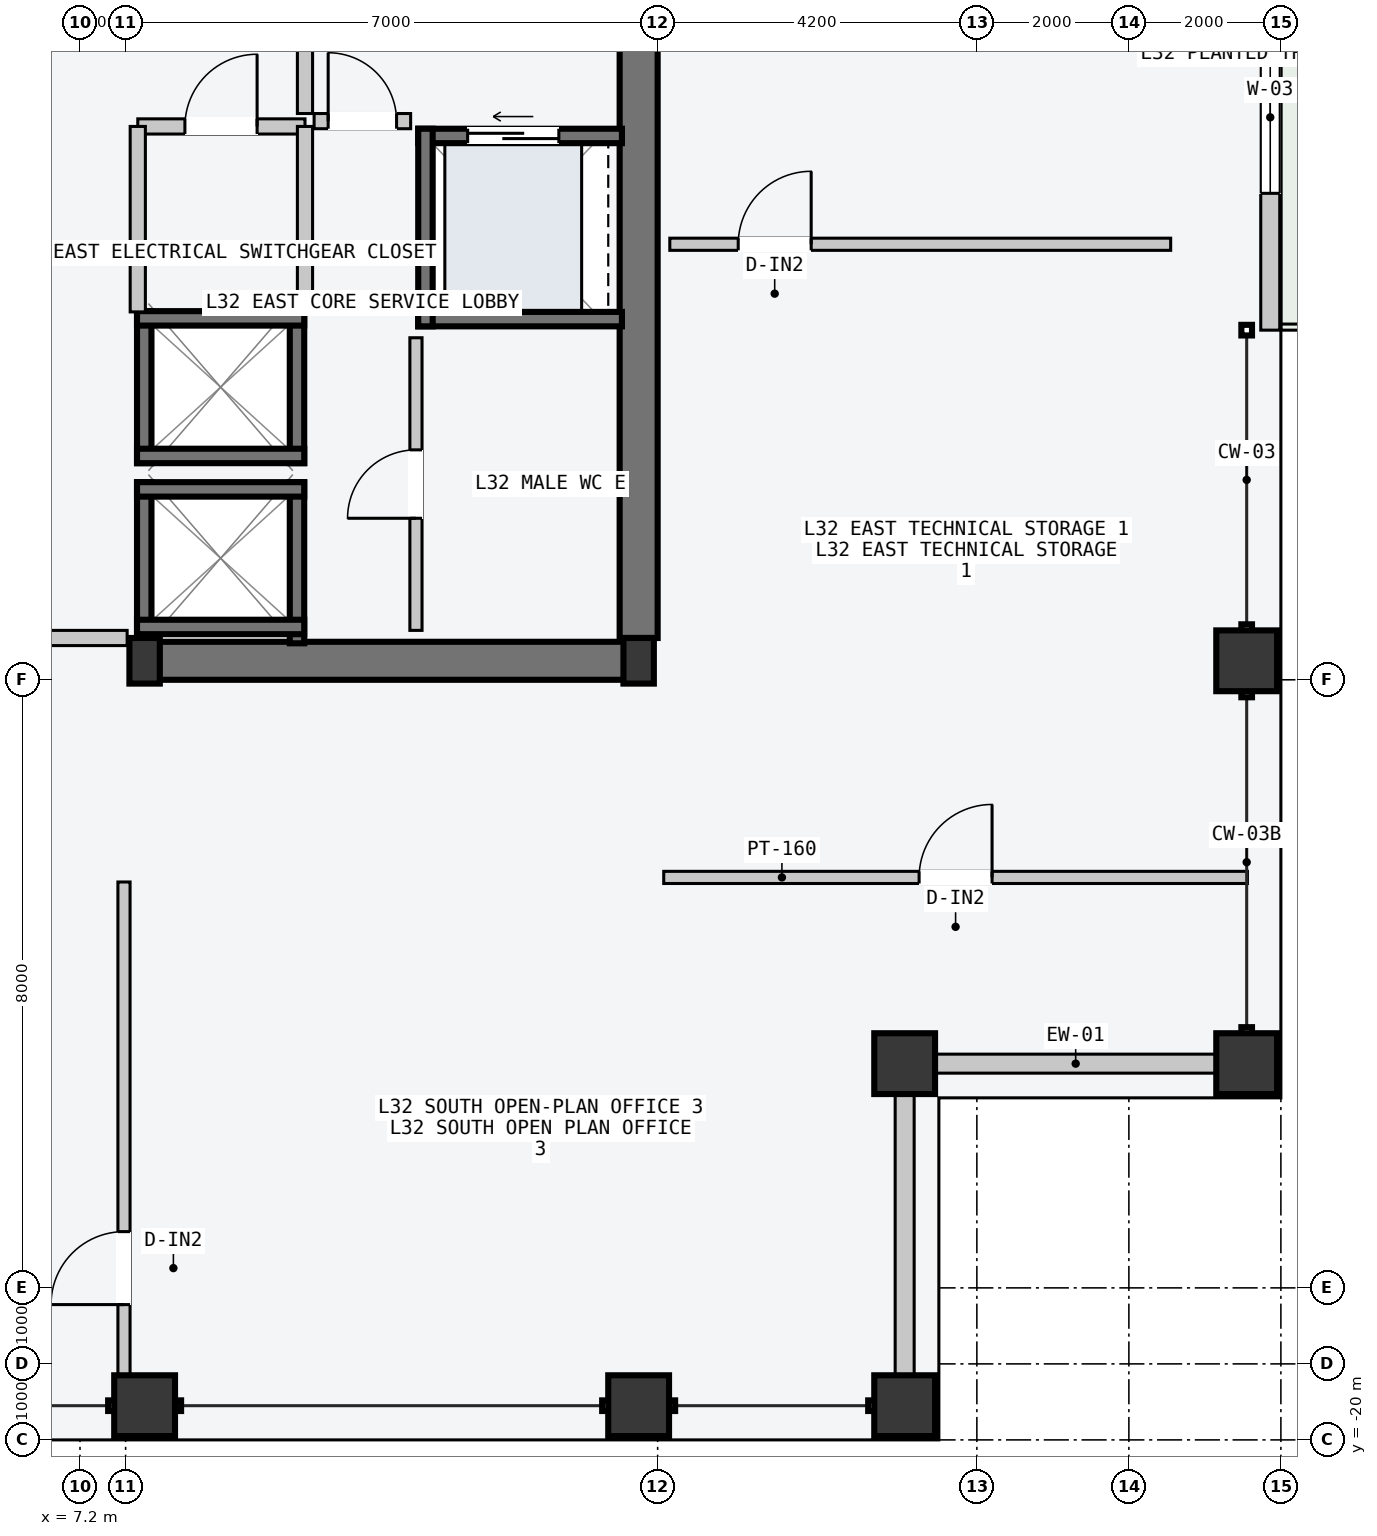
"""IFC4 building model, lengths in metres.
Left out: names, types, materials, properties, quantities, classifications, styles, units other than length and angle.
Written with IfcOpenShell. Run it as: python <this file> out.ifc"""

import sys

from ifc_helpers import new_model, si_unit, direction, frame, frame_2d, origin, origin_2d, place, context, subcontext, project, spatial, rectangle, hollow_rectangle, i_section, extrude, element, fill, save


model = new_model("IFC4")
c1 = context("Model", 3, precision=1e-05, world=origin(), true_north=direction((0.0, 1.0)))
c2 = subcontext(c1, "Body", "Model", "MODEL_VIEW")
j1 = project(units=[si_unit("LENGTHUNIT", "METRE"), si_unit("PLANEANGLEUNIT", "RADIAN")], contexts=[c1])
p1 = place(None, origin())
s1 = spatial("IfcSite", under=j1, at=p1, CompositionType="ELEMENT")
p2 = place(p1, origin())
s2 = spatial("IfcBuilding", under=s1, at=p2, CompositionType="ELEMENT")
p3 = place(p2, frame((0.0, 0.0, 124.2)))
s3 = spatial("IfcBuildingStorey", under=s2, at=p3, CompositionType="ELEMENT", Elevation=124.2)
p4 = place(p3, frame((8.07, -9.75, -0.2), z_axis=(0.0, 0.0, 1.0), x_axis=(1.0, 0.0, 0.0)))
e1 = element("IfcWall", 1, at=p4, inside=s3, PredefinedType="SHEAR", context=c2, shape_type="SweptSolid", body=[
    extrude(rectangle(XDim=6.46, YDim=0.5, at=frame_2d((3.23, 0.0))), origin(), (0.0, 0.0, 1.0), 3.6),
])
p5 = place(p3, frame((14.55, -9.45, -0.2), z_axis=(0.0, 0.0, 1.0), x_axis=(0.0, 1.0, 0.0)))
e2 = element("IfcWall", 2, at=p5, inside=s3, PredefinedType="SHEAR", context=c2, shape_type="SweptSolid", body=[
    extrude(rectangle(XDim=9.15, YDim=0.5, at=frame_2d((4.575, 0.0))), origin(), (0.0, 0.0, 1.0), 3.6),
])
for number, where, z_axis, x_axis in (
    (3, (8.05, -9.75, 0.0), (0.0, 0.0, 1.0), (1.0, 0.0, 0.0)),
    (4, (14.55, -9.75, 0.0), (0.0, 0.0, 1.0), (1.0, 0.0, 0.0)),
):
    element("IfcColumn", number, at=place(p3, frame(where, z_axis=z_axis, x_axis=x_axis)), inside=s3, PredefinedType="COLUMN", context=c2, shape_type="SweptSolid", body=[
        extrude(i_section(OverallWidth=0.4, OverallDepth=0.6, WebThickness=0.022, FlangeThickness=0.036, at=origin_2d()), origin(), (0.0, 0.0, 1.0), 3.6),
    ])
for number, where, z_axis, x_axis in (
    (5, (8.05, -19.55, 0.0), (0.0, 0.0, 1.0), (1.0, 0.0, 0.0)),
    (6, (14.55, -19.55, 0.0), (0.0, 0.0, 1.0), (1.0, 0.0, 0.0)),
    (7, (18.05, -19.55, 0.0), (0.0, 0.0, 1.0), (1.0, 0.0, 0.0)),
    (8, (22.55, -15.05, 0.0), (0.0, 0.0, 1.0), (0.0, 1.0, 0.0)),
    (9, (22.55, -9.75, 0.0), (0.0, 0.0, 1.0), (0.0, 1.0, 0.0)),
    (10, (18.05, -15.05, 0.0), (0.0, 0.0, 1.0), (1.0, 0.0, 0.0)),
):
    element("IfcColumn", number, at=place(p3, frame(where, z_axis=z_axis, x_axis=x_axis)), inside=s3, PredefinedType="COLUMN", context=c2, shape_type="SweptSolid", body=[
        extrude(hollow_rectangle(XDim=0.8, YDim=0.8, WallThickness=0.036, at=origin_2d()), origin(), (0.0, 0.0, 1.0), 3.6),
    ])
p6 = place(p3, frame((22.86, -5.4, 0.0), z_axis=(0.0, 0.0, 1.0), x_axis=(0.0, 1.0, 0.0)))
e11 = element("IfcWall", 11, at=p6, inside=s3, PredefinedType="STANDARD", context=c2, shape_type="SweptSolid", body=[
    extrude(rectangle(XDim=10.8, YDim=0.25, at=frame_2d((5.4, 0.0))), origin(), (0.0, 0.0, 1.0), 3.4),
])
p7 = place(p6, frame((7.2, 0.0, 0.0)))
e12 = element("IfcOpeningElement", 12, at=p7, cuts=e11, PredefinedType="OPENING", context=c2, shape_type="SweptSolid", body=[
    extrude(rectangle(XDim=1.6, YDim=2.2, at=frame_2d((0.8, 1.1))), frame((0.0, 0.135, 0.0), z_axis=(0.0, -1.0, 0.0), x_axis=(1.0, 0.0, 0.0)), (0.0, 0.0, 1.0), 0.27),
])
p8 = place(p6, frame((1.8, 0.0, 0.85)))
e13 = element("IfcOpeningElement", 13, at=p8, cuts=e11, PredefinedType="OPENING", context=c2, shape_type="SweptSolid", body=[
    extrude(rectangle(XDim=2.0, YDim=2.1, at=frame_2d((1.0, 1.05))), frame((0.0, 0.135, 0.0), z_axis=(0.0, -1.0, 0.0), x_axis=(1.0, 0.0, 0.0)), (0.0, 0.0, 1.0), 0.27),
])
for number, where, z_axis, x_axis in (
    (14, (18.46, -15.05, 0.0), (0.0, 0.0, 1.0), (1.0, 0.0, 0.0)),
    (15, (18.05, -19.14, 0.0), (0.0, 0.0, 1.0), (0.0, 1.0, 0.0)),
):
    element("IfcWall", number, at=place(p3, frame(where, z_axis=z_axis, x_axis=x_axis)), inside=s3, PredefinedType="STANDARD", context=c2, shape_type="SweptSolid", body=[
        extrude(rectangle(XDim=3.68, YDim=0.25, at=frame_2d((1.84, 0.0))), origin(), (0.0, 0.0, 1.0), 2.75),
    ])
for number, where, z_axis, x_axis in (
    (16, (8.045, -9.52, -0.2), (0.0, 0.0, 1.0), (0.0, 1.0, 0.0)),
    (17, (10.055, -9.52, -0.2), (0.0, 0.0, 1.0), (0.0, 1.0, 0.0)),
):
    element("IfcWall", number, at=place(p3, frame(where, z_axis=z_axis, x_axis=x_axis)), inside=s3, PredefinedType="SOLIDWALL", context=c2, shape_type="SweptSolid", body=[
        extrude(rectangle(XDim=2.12, YDim=0.19, at=frame_2d((1.06, 0.0))), origin(), (0.0, 0.0, 1.0), 3.6),
    ])
for number, where, z_axis, x_axis in (
    (18, (7.95, -7.495, -0.2), (0.0, 0.0, 1.0), (1.0, 0.0, 0.0)),
    (19, (7.95, -9.305, -0.2), (0.0, 0.0, 1.0), (1.0, 0.0, 0.0)),
):
    element("IfcWall", number, at=place(p3, frame(where, z_axis=z_axis, x_axis=x_axis)), inside=s3, PredefinedType="SOLIDWALL", context=c2, shape_type="SweptSolid", body=[
        extrude(rectangle(XDim=2.2, YDim=0.19, at=frame_2d((1.1, 0.0))), origin(), (0.0, 0.0, 1.0), 3.6),
    ])
for number, where, z_axis, x_axis in (
    (20, (8.045, -7.15, -0.2), (0.0, 0.0, 1.0), (0.0, 1.0, 0.0)),
    (21, (10.055, -7.15, -0.2), (0.0, 0.0, 1.0), (0.0, 1.0, 0.0)),
):
    element("IfcWall", number, at=place(p3, frame(where, z_axis=z_axis, x_axis=x_axis)), inside=s3, PredefinedType="SOLIDWALL", context=c2, shape_type="SweptSolid", body=[
        extrude(rectangle(XDim=2.0, YDim=0.19, at=frame_2d((1.0, 0.0))), origin(), (0.0, 0.0, 1.0), 3.6),
    ])
for number, where, z_axis, x_axis in (
    (22, (7.95, -5.245, -0.2), (0.0, 0.0, 1.0), (1.0, 0.0, 0.0)),
    (23, (7.95, -7.055, -0.2), (0.0, 0.0, 1.0), (1.0, 0.0, 0.0)),
):
    element("IfcWall", number, at=place(p3, frame(where, z_axis=z_axis, x_axis=x_axis)), inside=s3, PredefinedType="SOLIDWALL", context=c2, shape_type="SweptSolid", body=[
        extrude(rectangle(XDim=2.2, YDim=0.19, at=frame_2d((1.1, 0.0))), origin(), (0.0, 0.0, 1.0), 3.6),
    ])
p9 = place(p3, frame((11.65, -2.845, -0.2), z_axis=(0.0, 0.0, 1.0), x_axis=(1.0, 0.0, 0.0)))
e24 = element("IfcWall", 24, at=p9, inside=s3, PredefinedType="SOLIDWALL", context=c2, shape_type="SweptSolid", body=[
    extrude(rectangle(XDim=2.68, YDim=0.19, at=frame_2d((1.34, 0.0))), origin(), (0.0, 0.0, 1.0), 3.6),
])
p10 = place(p9, frame((0.65, 0.0, 0.2)))
e25 = element("IfcOpeningElement", 25, at=p10, cuts=e24, PredefinedType="OPENING", context=c2, shape_type="SweptSolid", body=[
    extrude(rectangle(XDim=1.2, YDim=2.2, at=frame_2d((0.6, 1.1))), frame((0.0, 0.105, 0.0), z_axis=(0.0, -1.0, 0.0), x_axis=(1.0, 0.0, 0.0)), (0.0, 0.0, 1.0), 0.21),
])
p11 = place(p3, frame((11.65, -5.255, -0.2), z_axis=(0.0, 0.0, 1.0), x_axis=(1.0, 0.0, 0.0)))
e26 = element("IfcWall", 26, at=p11, inside=s3, PredefinedType="SOLIDWALL", context=c2, shape_type="SweptSolid", body=[
    extrude(rectangle(XDim=2.68, YDim=0.19, at=frame_2d((1.34, 0.0))), origin(), (0.0, 0.0, 1.0), 3.6),
])
p12 = place(p3, frame((11.745, -5.35, -0.2), z_axis=(0.0, 0.0, 1.0), x_axis=(0.0, 1.0, 0.0)))
e27 = element("IfcWall", 27, at=p12, inside=s3, PredefinedType="SOLIDWALL", context=c2, shape_type="SweptSolid", body=[
    extrude(rectangle(XDim=2.6, YDim=0.19, at=frame_2d((1.3, 0.0))), origin(), (0.0, 0.0, 1.0), 3.6),
])
p13 = place(p3, frame((6.02, -9.45, 0.0), z_axis=(0.0, 0.0, 1.0), x_axis=(1.0, 0.0, 0.0)))
e28 = element("IfcWall", 28, at=p13, inside=s3, PredefinedType="PARTITIONING", context=c2, shape_type="SweptSolid", body=[
    extrude(rectangle(XDim=1.8, YDim=0.2, at=frame_2d((0.9, 0.0))), origin(), (0.0, 0.0, 1.0), 3.4),
])
p14 = place(p3, frame((10.16, -2.55, 0.0), z_axis=(0.0, 0.0, 1.0), x_axis=(0.0, 1.0, 0.0)))
e29 = element("IfcWall", 29, at=p14, inside=s3, PredefinedType="PARTITIONING", context=c2, shape_type="SweptSolid", body=[
    extrude(rectangle(XDim=3.4, YDim=0.2, at=frame_2d((1.7, 0.0))), origin(), (0.0, 0.0, 1.0), 3.4),
])
p15 = place(p14, frame((1.3, 0.0, 0.0)))
e30 = element("IfcOpeningElement", 30, at=p15, cuts=e29, PredefinedType="OPENING", context=c2, shape_type="SweptSolid", body=[
    extrude(rectangle(XDim=1.1, YDim=2.15, at=frame_2d((0.55, 1.075))), frame((0.0, 0.11, 0.0), z_axis=(0.0, -1.0, 0.0), x_axis=(1.0, 0.0, 0.0)), (0.0, 0.0, 1.0), 0.22),
])
p16 = place(p3, frame((10.28, -2.65, 0.0), z_axis=(0.0, 0.0, 1.0), x_axis=(1.0, 0.0, 0.0)))
e31 = element("IfcWall", 31, at=p16, inside=s3, PredefinedType="PARTITIONING", context=c2, shape_type="SweptSolid", body=[
    extrude(rectangle(XDim=1.27, YDim=0.2, at=frame_2d((0.635, 0.0))), origin(), (0.0, 0.0, 1.0), 3.4),
])
p17 = place(p16, frame((0.185, 0.0, 0.0)))
e32 = element("IfcOpeningElement", 32, at=p17, cuts=e31, PredefinedType="OPENING", context=c2, shape_type="SweptSolid", body=[
    extrude(rectangle(XDim=0.9, YDim=2.15, at=frame_2d((0.45, 1.075))), frame((0.0, 0.11, 0.0), z_axis=(0.0, -1.0, 0.0), x_axis=(1.0, 0.0, 0.0)), (0.0, 0.0, 1.0), 0.22),
])
p18 = place(p3, frame((7.96, -2.72, 0.0), z_axis=(0.0, 0.0, 1.0), x_axis=(1.0, 0.0, 0.0)))
e33 = element("IfcWall", 33, at=p18, inside=s3, PredefinedType="PARTITIONING", context=c2, shape_type="SweptSolid", body=[
    extrude(rectangle(XDim=2.2, YDim=0.2, at=frame_2d((1.1, 0.0))), origin(), (0.0, 0.0, 1.0), 3.4),
])
p19 = place(p18, frame((0.62, 0.0, 0.0)))
e34 = element("IfcOpeningElement", 34, at=p19, cuts=e33, PredefinedType="OPENING", context=c2, shape_type="SweptSolid", body=[
    extrude(rectangle(XDim=0.95, YDim=2.1, at=frame_2d((0.475, 1.05))), frame((0.0, 0.11, 0.0), z_axis=(0.0, -1.0, 0.0), x_axis=(1.0, 0.0, 0.0)), (0.0, 0.0, 1.0), 0.22),
])
for number, where, z_axis, x_axis in (
    (35, (7.96, -5.16, 0.0), (0.0, 0.0, 1.0), (0.0, 1.0, 0.0)),
    (36, (10.16, -5.16, 0.0), (0.0, 0.0, 1.0), (0.0, 1.0, 0.0)),
):
    element("IfcWall", number, at=place(p3, frame(where, z_axis=z_axis, x_axis=x_axis)), inside=s3, PredefinedType="PARTITIONING", context=c2, shape_type="SweptSolid", body=[
        extrude(rectangle(XDim=2.44, YDim=0.2, at=frame_2d((1.22, 0.0))), origin(), (0.0, 0.0, 1.0), 3.4),
    ])
p20 = place(p3, frame((11.62, -9.35, 0.0), z_axis=(0.0, 0.0, 1.0), x_axis=(0.0, 1.0, 0.0)))
e37 = element("IfcWall", 37, at=p20, inside=s3, PredefinedType="PARTITIONING", context=c2, shape_type="SweptSolid", body=[
    extrude(rectangle(XDim=3.85, YDim=0.16, at=frame_2d((1.925, 0.0))), origin(), (0.0, 0.0, 1.0), 3.4),
])
p21 = place(p20, frame((1.475, 0.0, 0.0)))
e38 = element("IfcOpeningElement", 38, at=p21, cuts=e37, PredefinedType="OPENING", context=c2, shape_type="SweptSolid", body=[
    extrude(rectangle(XDim=0.9, YDim=2.15, at=frame_2d((0.45, 1.075))), frame((0.0, 0.09, 0.0), z_axis=(0.0, -1.0, 0.0), x_axis=(1.0, 0.0, 0.0)), (0.0, 0.0, 1.0), 0.18),
])
p22 = place(p3, frame((7.779, -19.56, 0.0), z_axis=(0.0, 0.0, 1.0), x_axis=(0.0, 1.0, 0.0)))
e39 = element("IfcWall", 39, at=p22, inside=s3, PredefinedType="PARTITIONING", context=c2, shape_type="SweptSolid", body=[
    extrude(rectangle(XDim=6.9, YDim=0.16, at=frame_2d((3.45, 0.0))), origin(), (0.0, 0.0, 1.0), 3.4),
])
p23 = place(p22, frame((1.34, 0.0, 0.0)))
e40 = element("IfcOpeningElement", 40, at=p23, cuts=e39, PredefinedType="OPENING", context=c2, shape_type="SweptSolid", body=[
    extrude(rectangle(XDim=0.96, YDim=2.18, at=frame_2d((0.48, 1.09))), frame((0.0, 0.09, 0.0), z_axis=(0.0, -1.0, 0.0), x_axis=(1.0, 0.0, 0.0)), (0.0, 0.0, 1.0), 0.18),
])
p24 = place(p3, frame((14.88, -12.6, 0.0), z_axis=(0.0, 0.0, 1.0), x_axis=(1.0, 0.0, 0.0)))
e41 = element("IfcWall", 41, at=p24, inside=s3, PredefinedType="PARTITIONING", context=c2, shape_type="SweptSolid", body=[
    extrude(rectangle(XDim=7.68, YDim=0.16, at=frame_2d((3.84, 0.0))), origin(), (0.0, 0.0, 1.0), 3.4),
])
p25 = place(p24, frame((3.36, 0.0, 0.0)))
e42 = element("IfcOpeningElement", 42, at=p25, cuts=e41, PredefinedType="OPENING", context=c2, shape_type="SweptSolid", body=[
    extrude(rectangle(XDim=0.96, YDim=2.18, at=frame_2d((0.48, 1.09))), frame((0.0, 0.09, 0.0), z_axis=(0.0, -1.0, 0.0), x_axis=(1.0, 0.0, 0.0)), (0.0, 0.0, 1.0), 0.18),
])
p26 = place(p3, frame((14.96, -4.27, 0.0), z_axis=(0.0, 0.0, 1.0), x_axis=(1.0, 0.0, 0.0)))
e43 = element("IfcWall", 43, at=p26, inside=s3, PredefinedType="PARTITIONING", context=c2, shape_type="SweptSolid", body=[
    extrude(rectangle(XDim=6.59, YDim=0.16, at=frame_2d((3.295, 0.0))), origin(), (0.0, 0.0, 1.0), 3.4),
])
p27 = place(p26, frame((0.9, 0.0, 0.0)))
e44 = element("IfcOpeningElement", 44, at=p27, cuts=e43, PredefinedType="OPENING", context=c2, shape_type="SweptSolid", body=[
    extrude(rectangle(XDim=0.96, YDim=2.18, at=frame_2d((0.48, 1.09))), frame((0.0, 0.09, 0.0), z_axis=(0.0, -1.0, 0.0), x_axis=(1.0, 0.0, 0.0)), (0.0, 0.0, 1.0), 0.18),
])
p28 = place(p8, origin())
e45 = element("IfcWindow", 45, at=p28, inside=s3, PartitioningType="SINGLE_PANEL", PredefinedType="WINDOW", context=c2, shape_type="SweptSolid", body=[
    extrude(rectangle(XDim=2.0, YDim=2.1, at=frame_2d((1.0, 1.05))), frame((0.0, 0.03, 0.0), z_axis=(0.0, -1.0, 0.0), x_axis=(1.0, 0.0, 0.0)), (0.0, 0.0, 1.0), 0.06),
])
fill(e13, e45)
p29 = place(p10, origin())
e46 = element("IfcDoor", 46, at=p29, inside=s3, OperationType="SLIDING_TO_LEFT", PredefinedType="DOOR", context=c2, shape_type="SweptSolid", body=[
    extrude(rectangle(XDim=1.2, YDim=2.2, at=frame_2d((0.6, 1.1))), frame((0.0, 0.025, 0.0), z_axis=(0.0, -1.0, 0.0), x_axis=(1.0, 0.0, 0.0)), (0.0, 0.0, 1.0), 0.05),
])
fill(e25, e46)
p30 = place(p17, origin())
e47 = element("IfcDoor", 47, at=p30, inside=s3, OperationType="SINGLE_SWING_LEFT", PredefinedType="DOOR", context=c2, shape_type="SweptSolid", body=[
    extrude(rectangle(XDim=0.9, YDim=2.15, at=frame_2d((0.45, 1.075))), frame((0.0, 0.025, 0.0), z_axis=(0.0, -1.0, 0.0), x_axis=(1.0, 0.0, 0.0)), (0.0, 0.0, 1.0), 0.05),
])
fill(e32, e47)
p31 = place(p19, origin())
e48 = element("IfcDoor", 48, at=p31, inside=s3, OperationType="SINGLE_SWING_RIGHT", PredefinedType="DOOR", context=c2, shape_type="SweptSolid", body=[
    extrude(rectangle(XDim=0.95, YDim=2.1, at=frame_2d((0.475, 1.05))), frame((0.0, 0.025, 0.0), z_axis=(0.0, -1.0, 0.0), x_axis=(1.0, 0.0, 0.0)), (0.0, 0.0, 1.0), 0.05),
])
fill(e34, e48)
p32 = place(p21, origin())
e49 = element("IfcDoor", 49, at=p32, inside=s3, OperationType="SINGLE_SWING_LEFT", PredefinedType="DOOR", context=c2, shape_type="SweptSolid", body=[
    extrude(rectangle(XDim=0.9, YDim=2.15, at=frame_2d((0.45, 1.075))), frame((0.0, 0.025, 0.0), z_axis=(0.0, -1.0, 0.0), x_axis=(1.0, 0.0, 0.0)), (0.0, 0.0, 1.0), 0.05),
])
fill(e38, e49)
p33 = place(p23, origin())
e50 = element("IfcDoor", 50, at=p33, inside=s3, OperationType="SINGLE_SWING_LEFT", PredefinedType="DOOR", context=c2, shape_type="SweptSolid", body=[
    extrude(rectangle(XDim=0.96, YDim=2.18, at=frame_2d((0.48, 1.09))), frame((0.0, 0.025, 0.0), z_axis=(0.0, -1.0, 0.0), x_axis=(1.0, 0.0, 0.0)), (0.0, 0.0, 1.0), 0.05),
])
fill(e40, e50)
p34 = place(p25, origin())
e51 = element("IfcDoor", 51, at=p34, inside=s3, OperationType="SINGLE_SWING_RIGHT", PredefinedType="DOOR", context=c2, shape_type="SweptSolid", body=[
    extrude(rectangle(XDim=0.96, YDim=2.18, at=frame_2d((0.48, 1.09))), frame((0.0, 0.025, 0.0), z_axis=(0.0, -1.0, 0.0), x_axis=(1.0, 0.0, 0.0)), (0.0, 0.0, 1.0), 0.05),
])
fill(e42, e51)
p35 = place(p27, origin())
e52 = element("IfcDoor", 52, at=p35, inside=s3, OperationType="SINGLE_SWING_RIGHT", PredefinedType="DOOR", context=c2, shape_type="SweptSolid", body=[
    extrude(rectangle(XDim=0.96, YDim=2.18, at=frame_2d((0.48, 1.09))), frame((0.0, 0.025, 0.0), z_axis=(0.0, -1.0, 0.0), x_axis=(1.0, 0.0, 0.0)), (0.0, 0.0, 1.0), 0.05),
])
fill(e44, e52)
save(model, sys.argv[1])
